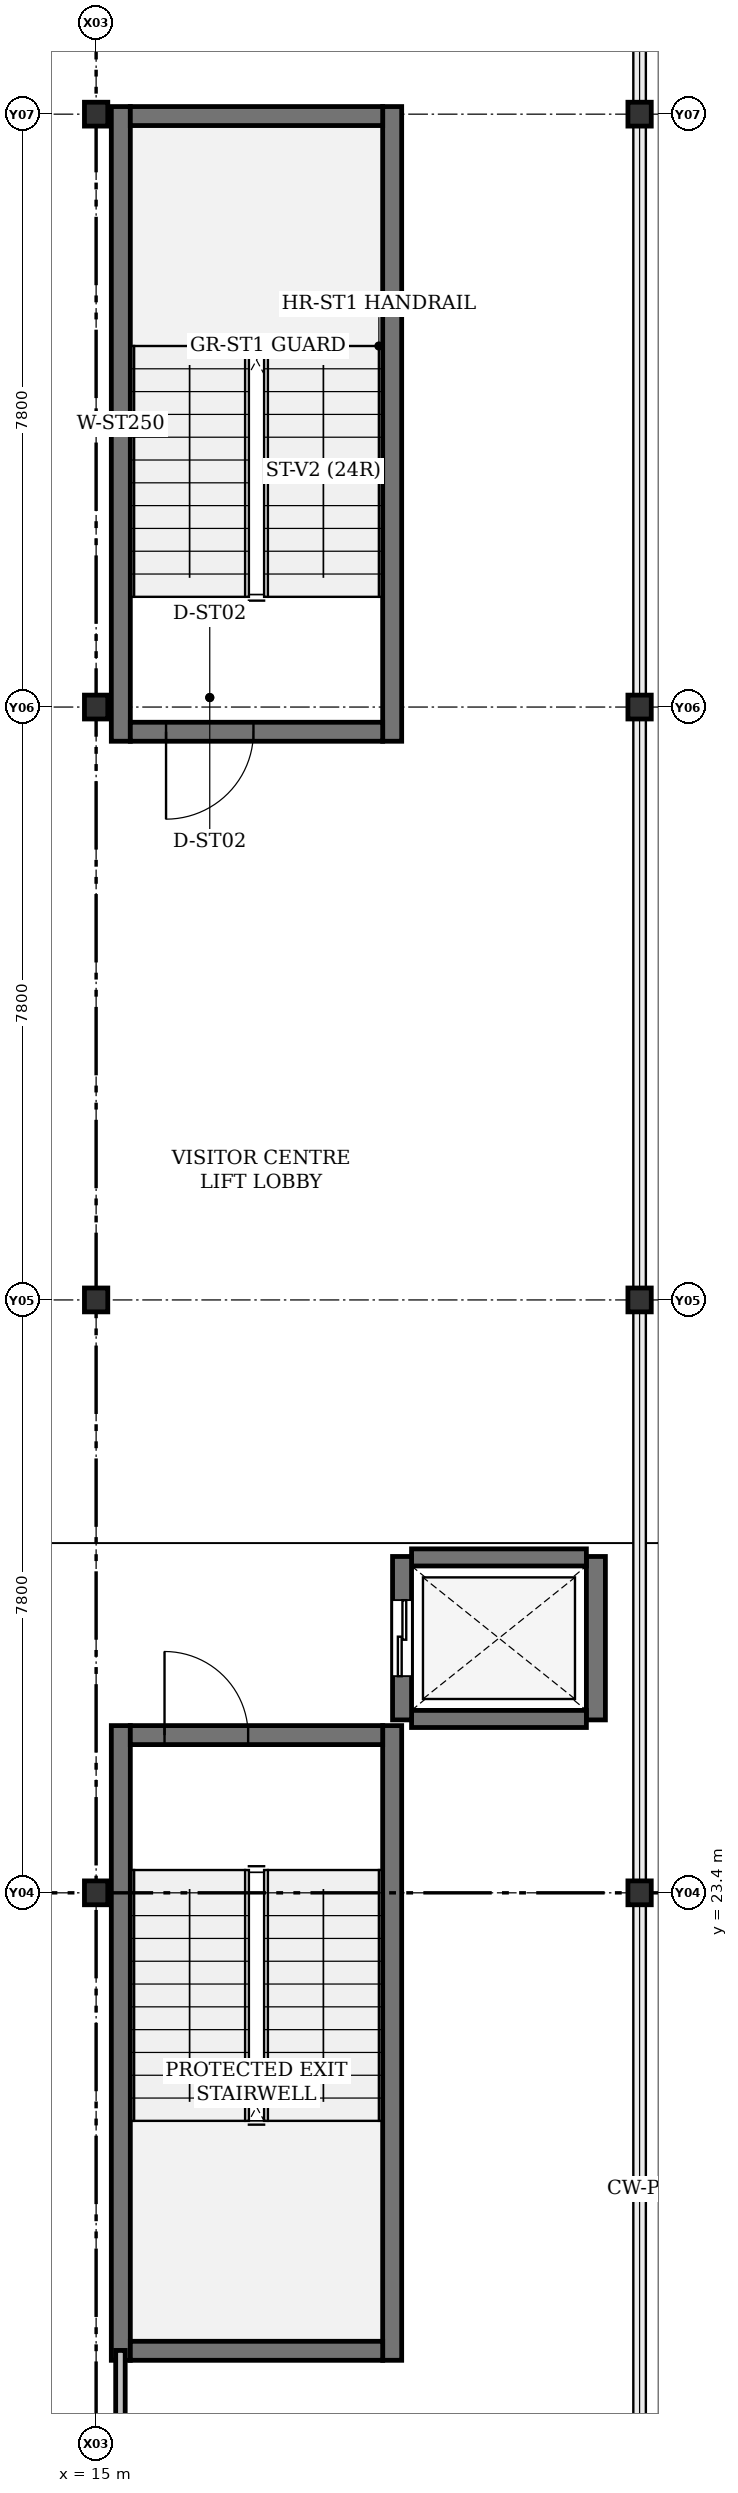
"""IFC4 building model, lengths in metres.
Left out: names, types, materials, properties, quantities, classifications, styles, units other than length and angle.
Written with IfcOpenShell. Run it as: python <this file> out.ifc"""

import sys

from ifc_helpers import new_model, si_unit, direction, frame, frame_2d, origin, origin_2d, place, context, subcontext, project, spatial, rectangle, i_section, extrude, element, fill, save


model = new_model("IFC4")
c1 = context("Model", 3, precision=1e-05, world=origin(), true_north=direction((0.0, 1.0)))
c2 = subcontext(c1, "Body", "Model", "MODEL_VIEW")
j1 = project(units=[si_unit("LENGTHUNIT", "METRE"), si_unit("PLANEANGLEUNIT", "RADIAN")], contexts=[c1])
p1 = place(None, origin())
s1 = spatial("IfcSite", under=j1, at=p1, CompositionType="ELEMENT")
p2 = place(p1, origin())
s2 = spatial("IfcBuilding", under=s1, at=p2, CompositionType="ELEMENT")
p3 = place(p2, frame((0.0, 0.0, 14.1)))
s3 = spatial("IfcBuildingStorey", under=s2, at=p3, CompositionType="ELEMENT", Elevation=14.1)
for number, where, z_axis, x_axis in (
    (1, (15.0, 23.4, 0.0), (0.0, 0.0, 1.0), (1.0, 0.0, 0.0)),
    (2, (15.0, 31.2, 0.0), (0.0, 0.0, 1.0), (1.0, 0.0, 0.0)),
    (3, (15.0, 39.0, 0.0), (0.0, 0.0, 1.0), (1.0, 0.0, 0.0)),
    (4, (15.0, 46.8, 0.0), (0.0, 0.0, 1.0), (1.0, 0.0, 0.0)),
    (5, (22.15, 23.4, 0.0), (0.0, 0.0, 1.0), (1.0, 0.0, 0.0)),
    (6, (22.15, 31.2, 0.0), (0.0, 0.0, 1.0), (1.0, 0.0, 0.0)),
    (7, (22.15, 39.0, 0.0), (0.0, 0.0, 1.0), (1.0, 0.0, 0.0)),
    (8, (22.15, 46.8, 0.0), (0.0, 0.0, 1.0), (1.0, 0.0, 0.0)),
):
    element("IfcColumn", number, at=place(p3, frame(where, z_axis=z_axis, x_axis=x_axis)), inside=s3, PredefinedType="COLUMN", context=c2, shape_type="SweptSolid", body=[
        extrude(i_section(OverallWidth=0.307, OverallDepth=0.314, WebThickness=0.012, FlangeThickness=0.019, FilletRadius=0.015, at=origin_2d()), origin(), (0.0, 0.0, 1.0), 4.2),
    ])
for number, where, z_axis, x_axis in (
    (9, (15.325, 17.25, 0.0), (0.0, 0.0, 1.0), (0.0, 1.0, 0.0)),
    (10, (18.895, 17.25, 0.0), (0.0, 0.0, 1.0), (0.0, 1.0, 0.0)),
):
    element("IfcWall", number, at=place(p3, frame(where, z_axis=z_axis, x_axis=x_axis)), inside=s3, PredefinedType="SHEAR", context=c2, shape_type="SweptSolid", body=[
        extrude(rectangle(XDim=8.35, YDim=0.25, at=frame_2d((4.175, 0.0))), origin(), (0.0, 0.0, 1.0), 4.2),
    ])
p4 = place(p3, frame((15.45, 17.375, 0.0), z_axis=(0.0, 0.0, 1.0), x_axis=(1.0, 0.0, 0.0)))
e11 = element("IfcWall", 11, at=p4, inside=s3, PredefinedType="SHEAR", context=c2, shape_type="SweptSolid", body=[
    extrude(rectangle(XDim=3.32, YDim=0.25, at=frame_2d((1.66, 0.0))), origin(), (0.0, 0.0, 1.0), 4.2),
])
p5 = place(p3, frame((15.45, 25.475, 0.0), z_axis=(0.0, 0.0, 1.0), x_axis=(1.0, 0.0, 0.0)))
e12 = element("IfcWall", 12, at=p5, inside=s3, PredefinedType="SHEAR", context=c2, shape_type="SweptSolid", body=[
    extrude(rectangle(XDim=3.32, YDim=0.25, at=frame_2d((1.66, 0.0))), origin(), (0.0, 0.0, 1.0), 4.2),
])
p6 = place(p5, frame((0.45, 0.0, 0.0)))
e13 = element("IfcOpeningElement", 13, at=p6, cuts=e12, PredefinedType="OPENING", context=c2, shape_type="SweptSolid", body=[
    extrude(rectangle(XDim=1.1, YDim=2.15, at=frame_2d((0.55, 1.075))), frame((0.0, 0.125, 0.0), z_axis=(0.0, -1.0, 0.0), x_axis=(1.0, 0.0, 0.0)), (0.0, 0.0, 1.0), 0.25),
])
for number, where, z_axis, x_axis in (
    (14, (15.325, 38.55, 0.0), (0.0, 0.0, 1.0), (0.0, 1.0, 0.0)),
    (15, (18.895, 38.55, 0.0), (0.0, 0.0, 1.0), (0.0, 1.0, 0.0)),
):
    element("IfcWall", number, at=place(p3, frame(where, z_axis=z_axis, x_axis=x_axis)), inside=s3, PredefinedType="SHEAR", context=c2, shape_type="SweptSolid", body=[
        extrude(rectangle(XDim=8.35, YDim=0.25, at=frame_2d((4.175, 0.0))), origin(), (0.0, 0.0, 1.0), 4.2),
    ])
p7 = place(p3, frame((15.45, 46.775, 0.0), z_axis=(0.0, 0.0, 1.0), x_axis=(1.0, 0.0, 0.0)))
e16 = element("IfcWall", 16, at=p7, inside=s3, PredefinedType="SHEAR", context=c2, shape_type="SweptSolid", body=[
    extrude(rectangle(XDim=3.32, YDim=0.25, at=frame_2d((1.66, 0.0))), origin(), (0.0, 0.0, 1.0), 4.2),
])
p8 = place(p3, frame((18.77, 38.675, 0.0), z_axis=(0.0, 0.0, 1.0), x_axis=(-1.0, 0.0, 0.0)))
e17 = element("IfcWall", 17, at=p8, inside=s3, PredefinedType="SHEAR", context=c2, shape_type="SweptSolid", body=[
    extrude(rectangle(XDim=3.32, YDim=0.25, at=frame_2d((1.66, 0.0))), origin(), (0.0, 0.0, 1.0), 4.2),
])
p9 = place(p8, frame((1.7, 0.0, 0.0)))
e18 = element("IfcOpeningElement", 18, at=p9, cuts=e17, PredefinedType="OPENING", context=c2, shape_type="SweptSolid", body=[
    extrude(rectangle(XDim=1.15, YDim=2.15, at=frame_2d((0.575, 1.075))), frame((0.0, 0.125, 0.0), z_axis=(0.0, -1.0, 0.0), x_axis=(1.0, 0.0, 0.0)), (0.0, 0.0, 1.0), 0.25),
])
p10 = place(p3, frame((21.575, 25.675, 0.0), z_axis=(0.0, 0.0, 1.0), x_axis=(0.0, 1.0, 0.0)))
e19 = element("IfcWall", 19, at=p10, inside=s3, PredefinedType="SHEAR", context=c2, shape_type="SweptSolid", body=[
    extrude(rectangle(XDim=2.15, YDim=0.25, at=frame_2d((1.075, 0.0))), origin(), (0.0, 0.0, 1.0), 4.2),
])
for number, where, z_axis, x_axis in (
    (20, (19.15, 25.688, 0.0), (0.0, 0.0, 1.0), (1.0, 0.0, 0.0)),
    (21, (19.15, 27.812, 0.0), (0.0, 0.0, 1.0), (1.0, 0.0, 0.0)),
):
    element("IfcWall", number, at=place(p3, frame(where, z_axis=z_axis, x_axis=x_axis)), inside=s3, PredefinedType="SHEAR", context=c2, shape_type="SweptSolid", body=[
        extrude(rectangle(XDim=2.3, YDim=0.225, at=frame_2d((1.15, 0.0))), origin(), (0.0, 0.0, 1.0), 4.2),
    ])
p11 = place(p3, frame((19.025, 25.675, 0.0), z_axis=(0.0, 0.0, 1.0), x_axis=(0.0, 1.0, 0.0)))
e22 = element("IfcWall", 22, at=p11, inside=s3, PredefinedType="SHEAR", context=c2, shape_type="SweptSolid", body=[
    extrude(rectangle(XDim=2.15, YDim=0.25, at=frame_2d((1.075, 0.0))), origin(), (0.0, 0.0, 1.0), 4.2),
])
p12 = place(p11, frame((0.575, 0.0, 0.0)))
e23 = element("IfcOpeningElement", 23, at=p12, cuts=e22, PredefinedType="OPENING", context=c2, shape_type="SweptSolid", body=[
    extrude(rectangle(XDim=1.0, YDim=2.1, at=frame_2d((0.5, 1.05))), frame((0.0, 0.125, 0.0), z_axis=(0.0, -1.0, 0.0), x_axis=(1.0, 0.0, 0.0)), (0.0, 0.0, 1.0), 0.25),
])
p13 = place(p3, frame((15.32, 15.6, 0.0), z_axis=(0.0, 0.0, 1.0), x_axis=(0.0, 1.0, 0.0)))
e24 = element("IfcWall", 24, at=p13, inside=s3, PredefinedType="PARTITIONING", context=c2, shape_type="SweptSolid", body=[
    extrude(rectangle(XDim=1.78, YDim=0.125, at=frame_2d((0.89, 0.0))), origin(), (0.0, 0.0, 1.0), 3.426),
])
p14 = place(p6, origin())
e25 = element("IfcDoor", 25, at=p14, inside=s3, OperationType="SINGLE_SWING_LEFT", PredefinedType="DOOR", context=c2, shape_type="SweptSolid", body=[
    extrude(rectangle(XDim=1.1, YDim=2.15, at=frame_2d((0.55, 1.075))), frame((0.0, 0.025, 0.0), z_axis=(0.0, -1.0, 0.0), x_axis=(1.0, 0.0, 0.0)), (0.0, 0.0, 1.0), 0.05),
])
fill(e13, e25)
p15 = place(p9, origin())
e26 = element("IfcDoor", 26, at=p15, inside=s3, OperationType="SINGLE_SWING_RIGHT", PredefinedType="DOOR", context=c2, shape_type="SweptSolid", body=[
    extrude(rectangle(XDim=1.15, YDim=2.15, at=frame_2d((0.575, 1.075))), frame((0.0, 0.025, 0.0), z_axis=(0.0, -1.0, 0.0), x_axis=(1.0, 0.0, 0.0)), (0.0, 0.0, 1.0), 0.05),
])
fill(e18, e26)
p16 = place(p12, origin())
e27 = element("IfcDoor", 27, at=p16, inside=s3, OperationType="SLIDING_TO_LEFT", PredefinedType="DOOR", context=c2, shape_type="SweptSolid", body=[
    extrude(rectangle(XDim=1.0, YDim=2.1, at=frame_2d((0.5, 1.05))), frame((0.0, 0.025, 0.0), z_axis=(0.0, -1.0, 0.0), x_axis=(1.0, 0.0, 0.0)), (0.0, 0.0, 1.0), 0.05),
])
fill(e23, e27)
save(model, sys.argv[1])
